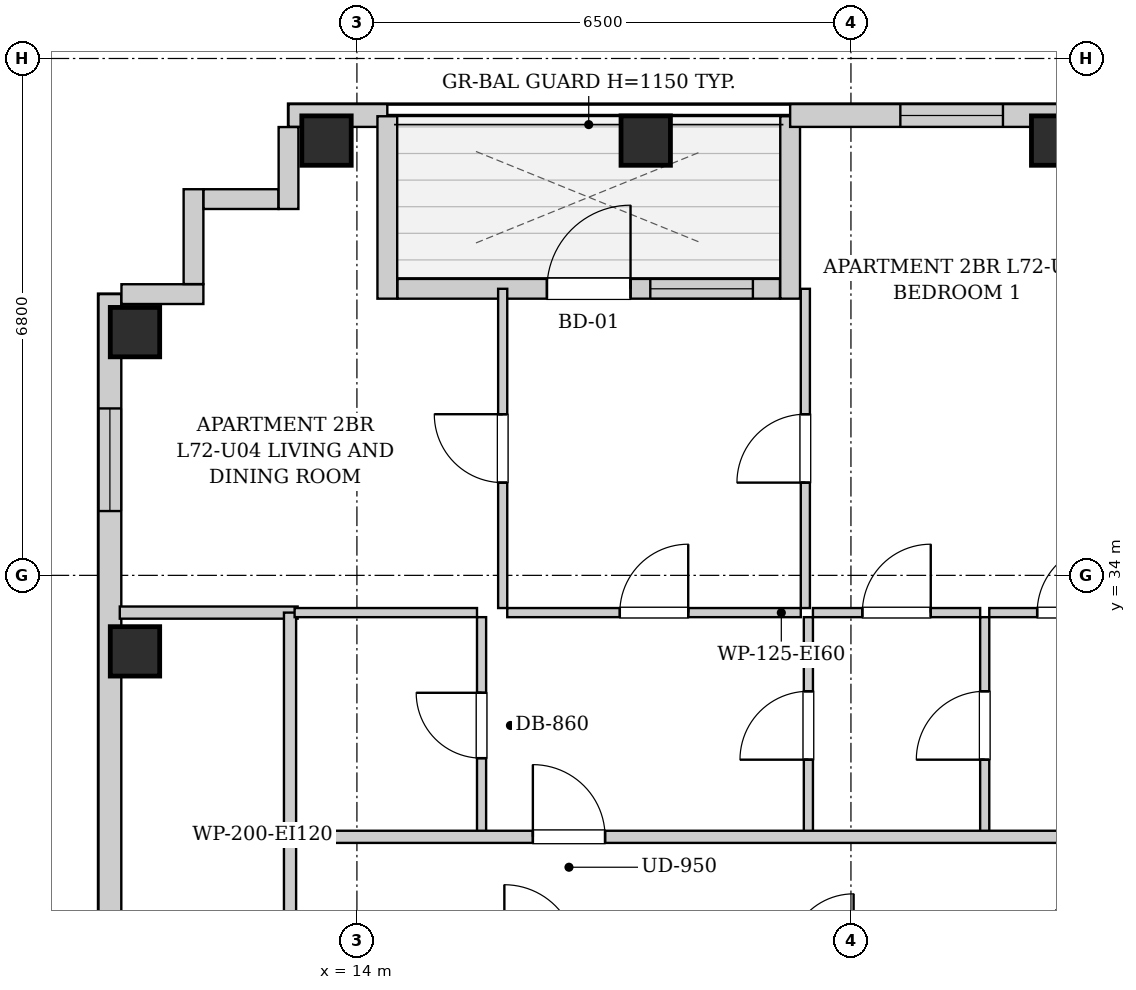
"""IFC4 building model, lengths in metres.
Left out: names, types, materials, properties, quantities, classifications, styles, units other than length and angle.
Written with IfcOpenShell. Run it as: python <this file> out.ifc"""

import sys

from ifc_helpers import new_model, si_unit, direction, frame, frame_2d, origin, origin_2d, place, context, subcontext, project, spatial, rectangle, extrude, element, fill, save


model = new_model("IFC4")
c1 = context("Model", 3, precision=1e-05, world=origin(), true_north=direction((0.0, 1.0)))
c2 = subcontext(c1, "Body", "Model", "MODEL_VIEW")
j1 = project(units=[si_unit("LENGTHUNIT", "METRE"), si_unit("PLANEANGLEUNIT", "RADIAN")], contexts=[c1])
p1 = place(None, origin())
s1 = spatial("IfcSite", under=j1, at=p1, CompositionType="ELEMENT")
p2 = place(p1, origin())
s2 = spatial("IfcBuilding", under=s1, at=p2, CompositionType="ELEMENT")
p3 = place(p2, frame((0.0, 0.0, 247.9)))
s3 = spatial("IfcBuildingStorey", under=s2, at=p3, CompositionType="ELEMENT", Elevation=247.9)
for number, where, z_axis, x_axis in (
    (1, (13.6, 39.72, 0.0), (0.0, 0.0, 1.0), (1.0, 0.0, 0.0)),
    (2, (17.8, 39.72, 0.0), (0.0, 0.0, 1.0), (1.0, 0.0, 0.0)),
    (3, (23.2, 39.72, 0.0), (0.0, 0.0, 1.0), (1.0, 0.0, 0.0)),
    (4, (11.08, 33.0, 0.0), (0.0, 0.0, 1.0), (1.0, 0.0, 0.0)),
    (5, (11.08, 37.2, 0.0), (0.0, 0.0, 1.0), (1.0, 0.0, 0.0)),
):
    element("IfcColumn", number, at=place(p3, frame(where, z_axis=z_axis, x_axis=x_axis)), inside=s3, PredefinedType="COLUMN", context=c2, shape_type="SweptSolid", body=[
        extrude(rectangle(XDim=0.65, YDim=0.65, at=origin_2d()), origin(), (0.0, 0.0, 1.0), 3.4),
    ])
p4 = place(p3, frame((13.1, 40.05, 0.0), z_axis=(0.0, 0.0, 1.0), x_axis=(1.0, 0.0, 0.0)))
e6 = element("IfcWall", 6, at=p4, inside=s3, PredefinedType="SOLIDWALL", context=c2, shape_type="SweptSolid", body=[
    extrude(rectangle(XDim=1.3, YDim=0.3, at=frame_2d((0.65, 0.0))), origin(), (0.0, 0.0, 1.0), 3.14),
])
p5 = place(p3, frame((14.4, 40.04, 0.0), z_axis=(0.0, 0.0, 1.0), x_axis=(0.0, -1.0, 0.0)))
e7 = element("IfcWall", 7, at=p5, inside=s3, PredefinedType="SOLIDWALL", context=c2, shape_type="SweptSolid", body=[
    extrude(rectangle(XDim=2.4, YDim=0.26, at=frame_2d((1.2, 0.0))), origin(), (0.0, 0.0, 1.0), 3.14),
])
p6 = place(p3, frame((14.534, 37.77, 0.0), z_axis=(0.0, 0.0, 1.0), x_axis=(1.0, 0.0, 0.0)))
e8 = element("IfcWall", 8, at=p6, inside=s3, PredefinedType="SOLIDWALL", context=c2, shape_type="SweptSolid", body=[
    extrude(rectangle(XDim=5.032, YDim=0.26, at=frame_2d((2.516, 0.0))), origin(), (0.0, 0.0, 1.0), 3.14),
])
p7 = place(p6, frame((1.966, 0.0, 0.0)))
e9 = element("IfcOpeningElement", 9, at=p7, cuts=e8, PredefinedType="OPENING", context=c2, shape_type="SweptSolid", body=[
    extrude(rectangle(XDim=1.1, YDim=2.0, at=frame_2d((0.55, 1.0))), frame((0.0, 0.14, 0.0), z_axis=(0.0, -1.0, 0.0), x_axis=(1.0, 0.0, 0.0)), (0.0, 0.0, 1.0), 0.28),
])
p8 = place(p6, frame((3.326, 0.0, 0.55)))
e10 = element("IfcOpeningElement", 10, at=p8, cuts=e8, PredefinedType="OPENING", context=c2, shape_type="SweptSolid", body=[
    extrude(rectangle(XDim=1.35, YDim=1.2, at=frame_2d((0.675, 0.6))), frame((0.0, 0.14, 0.0), z_axis=(0.0, -1.0, 0.0), x_axis=(1.0, 0.0, 0.0)), (0.0, 0.0, 1.0), 0.28),
])
p9 = place(p3, frame((19.7, 37.64, 0.0), z_axis=(0.0, 0.0, 1.0), x_axis=(0.0, 1.0, 0.0)))
e11 = element("IfcWall", 11, at=p9, inside=s3, PredefinedType="SOLIDWALL", context=c2, shape_type="SweptSolid", body=[
    extrude(rectangle(XDim=2.4, YDim=0.26, at=frame_2d((1.2, 0.0))), origin(), (0.0, 0.0, 1.0), 3.14),
])
p10 = place(p3, frame((19.7, 40.05, 0.0), z_axis=(0.0, 0.0, 1.0), x_axis=(1.0, 0.0, 0.0)))
e12 = element("IfcWall", 12, at=p10, inside=s3, PredefinedType="SOLIDWALL", context=c2, shape_type="SweptSolid", body=[
    extrude(rectangle(XDim=10.25, YDim=0.3, at=frame_2d((5.125, 0.0))), origin(), (0.0, 0.0, 1.0), 3.14),
])
p11 = place(p10, frame((1.45, 0.0, 0.55)))
e13 = element("IfcOpeningElement", 13, at=p11, cuts=e12, PredefinedType="OPENING", context=c2, shape_type="SweptSolid", body=[
    extrude(rectangle(XDim=1.35, YDim=1.2, at=frame_2d((0.675, 0.6))), frame((0.0, 0.16, 0.0), z_axis=(0.0, -1.0, 0.0), x_axis=(1.0, 0.0, 0.0)), (0.0, 0.0, 1.0), 0.32),
])
p12 = place(p10, frame((7.8, 0.0, 0.55)))
e14 = element("IfcOpeningElement", 14, at=p12, cuts=e12, PredefinedType="OPENING", context=c2, shape_type="SweptSolid", body=[
    extrude(rectangle(XDim=1.35, YDim=1.2, at=frame_2d((0.675, 0.6))), frame((0.0, 0.16, 0.0), z_axis=(0.0, -1.0, 0.0), x_axis=(1.0, 0.0, 0.0)), (0.0, 0.0, 1.0), 0.32),
])
p13 = place(p3, frame((10.75, 6.3, 0.0), z_axis=(0.0, 0.0, 1.0), x_axis=(0.0, 1.0, 0.0)))
e15 = element("IfcWall", 15, at=p13, inside=s3, PredefinedType="SOLIDWALL", context=c2, shape_type="SweptSolid", body=[
    extrude(rectangle(XDim=31.4, YDim=0.3, at=frame_2d((15.7, 0.0))), origin(), (0.0, 0.0, 1.0), 3.14),
])
p14 = place(p13, frame((28.546, 0.0, 0.55)))
e16 = element("IfcOpeningElement", 16, at=p14, cuts=e15, PredefinedType="OPENING", context=c2, shape_type="SweptSolid", body=[
    extrude(rectangle(XDim=1.35, YDim=1.2, at=frame_2d((0.675, 0.6))), frame((0.0, 0.16, 0.0), z_axis=(0.0, -1.0, 0.0), x_axis=(1.0, 0.0, 0.0)), (0.0, 0.0, 1.0), 0.32),
])
p15 = place(p13, frame((11.85, 0.0, 0.55)))
e17 = element("IfcOpeningElement", 17, at=p15, cuts=e15, PredefinedType="OPENING", context=c2, shape_type="SweptSolid", body=[
    extrude(rectangle(XDim=1.35, YDim=1.2, at=frame_2d((0.675, 0.6))), frame((0.0, 0.16, 0.0), z_axis=(0.0, -1.0, 0.0), x_axis=(1.0, 0.0, 0.0)), (0.0, 0.0, 1.0), 0.32),
])
p16 = place(p13, frame((9.185, 0.0, 0.55)))
e18 = element("IfcOpeningElement", 18, at=p16, cuts=e15, PredefinedType="OPENING", context=c2, shape_type="SweptSolid", body=[
    extrude(rectangle(XDim=1.35, YDim=1.2, at=frame_2d((0.675, 0.6))), frame((0.0, 0.16, 0.0), z_axis=(0.0, -1.0, 0.0), x_axis=(1.0, 0.0, 0.0)), (0.0, 0.0, 1.0), 0.32),
])
p17 = place(p13, frame((19.006, 0.0, 0.55)))
e19 = element("IfcOpeningElement", 19, at=p17, cuts=e15, PredefinedType="OPENING", context=c2, shape_type="SweptSolid", body=[
    extrude(rectangle(XDim=1.35, YDim=1.2, at=frame_2d((0.675, 0.6))), frame((0.0, 0.16, 0.0), z_axis=(0.0, -1.0, 0.0), x_axis=(1.0, 0.0, 0.0)), (0.0, 0.0, 1.0), 0.32),
])
p18 = place(p13, frame((20.616, 0.0, 0.55)))
e20 = element("IfcOpeningElement", 20, at=p18, cuts=e15, PredefinedType="OPENING", context=c2, shape_type="SweptSolid", body=[
    extrude(rectangle(XDim=1.35, YDim=1.2, at=frame_2d((0.675, 0.6))), frame((0.0, 0.16, 0.0), z_axis=(0.0, -1.0, 0.0), x_axis=(1.0, 0.0, 0.0)), (0.0, 0.0, 1.0), 0.32),
])
p19 = place(p3, frame((10.902, 37.7, 0.0), z_axis=(0.0, 0.0, 1.0), x_axis=(1.0, 0.0, 0.0)))
e21 = element("IfcWall", 21, at=p19, inside=s3, PredefinedType="SOLIDWALL", context=c2, shape_type="SweptSolid", body=[
    extrude(rectangle(XDim=1.078, YDim=0.26, at=frame_2d((0.539, 0.0))), origin(), (0.0, 0.0, 1.0), 3.14),
])
p20 = place(p3, frame((11.85, 37.832, 0.0), z_axis=(0.0, 0.0, 1.0), x_axis=(0.0, 1.0, 0.0)))
e22 = element("IfcWall", 22, at=p20, inside=s3, PredefinedType="SOLIDWALL", context=c2, shape_type="SweptSolid", body=[
    extrude(rectangle(XDim=1.248, YDim=0.26, at=frame_2d((0.624, 0.0))), origin(), (0.0, 0.0, 1.0), 3.14),
])
p21 = place(p3, frame((11.982, 38.95, 0.0), z_axis=(0.0, 0.0, 1.0), x_axis=(1.0, 0.0, 0.0)))
e23 = element("IfcWall", 23, at=p21, inside=s3, PredefinedType="SOLIDWALL", context=c2, shape_type="SweptSolid", body=[
    extrude(rectangle(XDim=0.986, YDim=0.26, at=frame_2d((0.493, 0.0))), origin(), (0.0, 0.0, 1.0), 3.14),
])
p22 = place(p3, frame((13.1, 38.82, 0.0), z_axis=(0.0, 0.0, 1.0), x_axis=(0.0, 1.0, 0.0)))
e24 = element("IfcWall", 24, at=p22, inside=s3, PredefinedType="SOLIDWALL", context=c2, shape_type="SweptSolid", body=[
    extrude(rectangle(XDim=1.078, YDim=0.26, at=frame_2d((0.539, 0.0))), origin(), (0.0, 0.0, 1.0), 3.14),
])
p23 = place(p3, frame((13.12, 28.98, 0.0), z_axis=(0.0, 0.0, 1.0), x_axis=(0.0, 1.0, 0.0)))
e25 = element("IfcWall", 25, at=p23, inside=s3, PredefinedType="PARTITIONING", context=c2, shape_type="SweptSolid", body=[
    extrude(rectangle(XDim=1.58, YDim=0.16, at=frame_2d((0.79, 0.0))), origin(), (0.0, 0.0, 1.0), 3.14),
])
p24 = place(p3, frame((10.88, 33.51, 0.0), z_axis=(0.0, 0.0, 1.0), x_axis=(1.0, 0.0, 0.0)))
e26 = element("IfcWall", 26, at=p24, inside=s3, PredefinedType="PARTITIONING", context=c2, shape_type="SweptSolid", body=[
    extrude(rectangle(XDim=2.34, YDim=0.16, at=frame_2d((1.17, 0.0))), origin(), (0.0, 0.0, 1.0), 3.14),
])
p25 = place(p3, frame((13.12, 30.6, 0.0), z_axis=(0.0, 0.0, 1.0), x_axis=(0.0, 1.0, 0.0)))
e27 = element("IfcWall", 27, at=p25, inside=s3, PredefinedType="PARTITIONING", context=c2, shape_type="SweptSolid", body=[
    extrude(rectangle(XDim=2.91, YDim=0.16, at=frame_2d((1.455, 0.0))), origin(), (0.0, 0.0, 1.0), 3.14),
])
p26 = place(p3, frame((15.64, 30.6, 0.0), z_axis=(0.0, 0.0, 1.0), x_axis=(0.0, 1.0, 0.0)))
e28 = element("IfcWall", 28, at=p26, inside=s3, PredefinedType="PARTITIONING", context=c2, shape_type="SweptSolid", body=[
    extrude(rectangle(XDim=2.85, YDim=0.12, at=frame_2d((1.425, 0.0))), origin(), (0.0, 0.0, 1.0), 3.14),
])
p27 = place(p26, frame((0.995, 0.0, 0.0)))
e29 = element("IfcOpeningElement", 29, at=p27, cuts=e28, PredefinedType="OPENING", context=c2, shape_type="SweptSolid", body=[
    extrude(rectangle(XDim=0.86, YDim=2.05, at=frame_2d((0.43, 1.025))), frame((0.0, 0.07, 0.0), z_axis=(0.0, -1.0, 0.0), x_axis=(1.0, 0.0, 0.0)), (0.0, 0.0, 1.0), 0.14),
])
p28 = place(p3, frame((13.18, 33.51, 0.0), z_axis=(0.0, 0.0, 1.0), x_axis=(1.0, 0.0, 0.0)))
e30 = element("IfcWall", 30, at=p28, inside=s3, PredefinedType="PARTITIONING", context=c2, shape_type="SweptSolid", body=[
    extrude(rectangle(XDim=2.4, YDim=0.12, at=frame_2d((1.2, 0.0))), origin(), (0.0, 0.0, 1.0), 3.14),
])
p29 = place(p3, frame((19.94, 30.6, 0.0), z_axis=(0.0, 0.0, 1.0), x_axis=(0.0, 1.0, 0.0)))
e31 = element("IfcWall", 31, at=p29, inside=s3, PredefinedType="PARTITIONING", context=c2, shape_type="SweptSolid", body=[
    extrude(rectangle(XDim=2.85, YDim=0.12, at=frame_2d((1.425, 0.0))), origin(), (0.0, 0.0, 1.0), 3.14),
])
p30 = place(p29, frame((0.975, 0.0, 0.0)))
e32 = element("IfcOpeningElement", 32, at=p30, cuts=e31, PredefinedType="OPENING", context=c2, shape_type="SweptSolid", body=[
    extrude(rectangle(XDim=0.9, YDim=2.05, at=frame_2d((0.45, 1.025))), frame((0.0, 0.07, 0.0), z_axis=(0.0, -1.0, 0.0), x_axis=(1.0, 0.0, 0.0)), (0.0, 0.0, 1.0), 0.14),
])
p31 = place(p3, frame((15.978, 33.51, 0.0), z_axis=(0.0, 0.0, 1.0), x_axis=(1.0, 0.0, 0.0)))
e33 = element("IfcWall", 33, at=p31, inside=s3, PredefinedType="PARTITIONING", context=c2, shape_type="SweptSolid", body=[
    extrude(rectangle(XDim=3.862, YDim=0.12, at=frame_2d((1.931, 0.0))), origin(), (0.0, 0.0, 1.0), 3.14),
])
p32 = place(p31, frame((1.481, 0.0, 0.0)))
e34 = element("IfcOpeningElement", 34, at=p32, cuts=e33, PredefinedType="OPENING", context=c2, shape_type="SweptSolid", body=[
    extrude(rectangle(XDim=0.9, YDim=2.05, at=frame_2d((0.45, 1.025))), frame((0.0, 0.07, 0.0), z_axis=(0.0, -1.0, 0.0), x_axis=(1.0, 0.0, 0.0)), (0.0, 0.0, 1.0), 0.14),
])
p33 = place(p3, frame((22.26, 30.6, 0.0), z_axis=(0.0, 0.0, 1.0), x_axis=(0.0, 1.0, 0.0)))
e35 = element("IfcWall", 35, at=p33, inside=s3, PredefinedType="PARTITIONING", context=c2, shape_type="SweptSolid", body=[
    extrude(rectangle(XDim=2.85, YDim=0.12, at=frame_2d((1.425, 0.0))), origin(), (0.0, 0.0, 1.0), 3.14),
])
p34 = place(p33, frame((0.975, 0.0, 0.0)))
e36 = element("IfcOpeningElement", 36, at=p34, cuts=e35, PredefinedType="OPENING", context=c2, shape_type="SweptSolid", body=[
    extrude(rectangle(XDim=0.9, YDim=2.05, at=frame_2d((0.45, 1.025))), frame((0.0, 0.07, 0.0), z_axis=(0.0, -1.0, 0.0), x_axis=(1.0, 0.0, 0.0)), (0.0, 0.0, 1.0), 0.14),
])
p35 = place(p3, frame((20.0, 33.51, 0.0), z_axis=(0.0, 0.0, 1.0), x_axis=(1.0, 0.0, 0.0)))
e37 = element("IfcWall", 37, at=p35, inside=s3, PredefinedType="PARTITIONING", context=c2, shape_type="SweptSolid", body=[
    extrude(rectangle(XDim=2.2, YDim=0.12, at=frame_2d((1.1, 0.0))), origin(), (0.0, 0.0, 1.0), 3.14),
])
p36 = place(p35, frame((0.65, 0.0, 0.0)))
e38 = element("IfcOpeningElement", 38, at=p36, cuts=e37, PredefinedType="OPENING", context=c2, shape_type="SweptSolid", body=[
    extrude(rectangle(XDim=0.9, YDim=2.05, at=frame_2d((0.45, 1.025))), frame((0.0, 0.07, 0.0), z_axis=(0.0, -1.0, 0.0), x_axis=(1.0, 0.0, 0.0)), (0.0, 0.0, 1.0), 0.14),
])
p37 = place(p3, frame((22.32, 33.51, 0.0), z_axis=(0.0, 0.0, 1.0), x_axis=(1.0, 0.0, 0.0)))
e39 = element("IfcWall", 39, at=p37, inside=s3, PredefinedType="PARTITIONING", context=c2, shape_type="SweptSolid", body=[
    extrude(rectangle(XDim=2.16, YDim=0.12, at=frame_2d((1.08, 0.0))), origin(), (0.0, 0.0, 1.0), 3.14),
])
p38 = place(p37, frame((0.63, 0.0, 0.0)))
e40 = element("IfcOpeningElement", 40, at=p38, cuts=e39, PredefinedType="OPENING", context=c2, shape_type="SweptSolid", body=[
    extrude(rectangle(XDim=0.9, YDim=2.05, at=frame_2d((0.45, 1.025))), frame((0.0, 0.07, 0.0), z_axis=(0.0, -1.0, 0.0), x_axis=(1.0, 0.0, 0.0)), (0.0, 0.0, 1.0), 0.14),
])
p39 = place(p3, frame((15.918, 33.57, 0.0), z_axis=(0.0, 0.0, 1.0), x_axis=(0.0, 1.0, 0.0)))
e41 = element("IfcWall", 41, at=p39, inside=s3, PredefinedType="PARTITIONING", context=c2, shape_type="SweptSolid", body=[
    extrude(rectangle(XDim=4.2, YDim=0.12, at=frame_2d((2.1, 0.0))), origin(), (0.0, 0.0, 1.0), 3.14),
])
p40 = place(p39, frame((1.65, 0.0, 0.0)))
e42 = element("IfcOpeningElement", 42, at=p40, cuts=e41, PredefinedType="OPENING", context=c2, shape_type="SweptSolid", body=[
    extrude(rectangle(XDim=0.9, YDim=2.05, at=frame_2d((0.45, 1.025))), frame((0.0, 0.07, 0.0), z_axis=(0.0, -1.0, 0.0), x_axis=(1.0, 0.0, 0.0)), (0.0, 0.0, 1.0), 0.14),
])
p41 = place(p3, frame((19.9, 33.57, 0.0), z_axis=(0.0, 0.0, 1.0), x_axis=(0.0, 1.0, 0.0)))
e43 = element("IfcWall", 43, at=p41, inside=s3, PredefinedType="PARTITIONING", context=c2, shape_type="SweptSolid", body=[
    extrude(rectangle(XDim=4.2, YDim=0.12, at=frame_2d((2.1, 0.0))), origin(), (0.0, 0.0, 1.0), 3.14),
])
p42 = place(p41, frame((1.65, 0.0, 0.0)))
e44 = element("IfcOpeningElement", 44, at=p42, cuts=e43, PredefinedType="OPENING", context=c2, shape_type="SweptSolid", body=[
    extrude(rectangle(XDim=0.9, YDim=2.05, at=frame_2d((0.45, 1.025))), frame((0.0, 0.07, 0.0), z_axis=(0.0, -1.0, 0.0), x_axis=(1.0, 0.0, 0.0)), (0.0, 0.0, 1.0), 0.14),
])
p43 = place(p3, frame((13.15, 30.56, 0.0), z_axis=(0.0, 0.0, 1.0), x_axis=(1.0, 0.0, 0.0)))
e45 = element("IfcWall", 45, at=p43, inside=s3, PredefinedType="PARTITIONING", context=c2, shape_type="SweptSolid", body=[
    extrude(rectangle(XDim=24.6, YDim=0.16, at=frame_2d((12.3, 0.0))), origin(), (0.0, 0.0, 1.0), 3.14),
])
p44 = place(p43, frame((3.165, 0.0, 0.0)))
e46 = element("IfcOpeningElement", 46, at=p44, cuts=e45, PredefinedType="OPENING", context=c2, shape_type="SweptSolid", body=[
    extrude(rectangle(XDim=0.95, YDim=2.1, at=frame_2d((0.475, 1.05))), frame((0.0, 0.09, 0.0), z_axis=(0.0, -1.0, 0.0), x_axis=(1.0, 0.0, 0.0)), (0.0, 0.0, 1.0), 0.18),
])
p45 = place(p43, frame((20.585, 0.0, 0.0)))
e47 = element("IfcOpeningElement", 47, at=p45, cuts=e45, PredefinedType="OPENING", context=c2, shape_type="SweptSolid", body=[
    extrude(rectangle(XDim=0.95, YDim=2.1, at=frame_2d((0.475, 1.05))), frame((0.0, 0.09, 0.0), z_axis=(0.0, -1.0, 0.0), x_axis=(1.0, 0.0, 0.0)), (0.0, 0.0, 1.0), 0.18),
])
p46 = place(p27, origin())
e48 = element("IfcDoor", 48, at=p46, inside=s3, OperationType="SINGLE_SWING_RIGHT", PredefinedType="DOOR", context=c2, shape_type="SweptSolid", body=[
    extrude(rectangle(XDim=0.86, YDim=2.05, at=frame_2d((0.43, 1.025))), frame((0.0, 0.025, 0.0), z_axis=(0.0, -1.0, 0.0), x_axis=(1.0, 0.0, 0.0)), (0.0, 0.0, 1.0), 0.05),
])
fill(e29, e48)
p47 = place(p30, origin())
e49 = element("IfcDoor", 49, at=p47, inside=s3, OperationType="SINGLE_SWING_LEFT", PredefinedType="DOOR", context=c2, shape_type="SweptSolid", body=[
    extrude(rectangle(XDim=0.9, YDim=2.05, at=frame_2d((0.45, 1.025))), frame((0.0, 0.025, 0.0), z_axis=(0.0, -1.0, 0.0), x_axis=(1.0, 0.0, 0.0)), (0.0, 0.0, 1.0), 0.05),
])
fill(e32, e49)
p48 = place(p32, origin())
e50 = element("IfcDoor", 50, at=p48, inside=s3, OperationType="SINGLE_SWING_RIGHT", PredefinedType="DOOR", context=c2, shape_type="SweptSolid", body=[
    extrude(rectangle(XDim=0.9, YDim=2.05, at=frame_2d((0.45, 1.025))), frame((0.0, 0.025, 0.0), z_axis=(0.0, -1.0, 0.0), x_axis=(1.0, 0.0, 0.0)), (0.0, 0.0, 1.0), 0.05),
])
fill(e34, e50)
p49 = place(p34, origin())
e51 = element("IfcDoor", 51, at=p49, inside=s3, OperationType="SINGLE_SWING_LEFT", PredefinedType="DOOR", context=c2, shape_type="SweptSolid", body=[
    extrude(rectangle(XDim=0.9, YDim=2.05, at=frame_2d((0.45, 1.025))), frame((0.0, 0.025, 0.0), z_axis=(0.0, -1.0, 0.0), x_axis=(1.0, 0.0, 0.0)), (0.0, 0.0, 1.0), 0.05),
])
fill(e36, e51)
p50 = place(p36, origin())
e52 = element("IfcDoor", 52, at=p50, inside=s3, OperationType="SINGLE_SWING_RIGHT", PredefinedType="DOOR", context=c2, shape_type="SweptSolid", body=[
    extrude(rectangle(XDim=0.9, YDim=2.05, at=frame_2d((0.45, 1.025))), frame((0.0, 0.025, 0.0), z_axis=(0.0, -1.0, 0.0), x_axis=(1.0, 0.0, 0.0)), (0.0, 0.0, 1.0), 0.05),
])
fill(e38, e52)
p51 = place(p38, origin())
e53 = element("IfcDoor", 53, at=p51, inside=s3, OperationType="SINGLE_SWING_RIGHT", PredefinedType="DOOR", context=c2, shape_type="SweptSolid", body=[
    extrude(rectangle(XDim=0.9, YDim=2.05, at=frame_2d((0.45, 1.025))), frame((0.0, 0.025, 0.0), z_axis=(0.0, -1.0, 0.0), x_axis=(1.0, 0.0, 0.0)), (0.0, 0.0, 1.0), 0.05),
])
fill(e40, e53)
p52 = place(p40, origin())
e54 = element("IfcDoor", 54, at=p52, inside=s3, OperationType="SINGLE_SWING_RIGHT", PredefinedType="DOOR", context=c2, shape_type="SweptSolid", body=[
    extrude(rectangle(XDim=0.9, YDim=2.05, at=frame_2d((0.45, 1.025))), frame((0.0, 0.025, 0.0), z_axis=(0.0, -1.0, 0.0), x_axis=(1.0, 0.0, 0.0)), (0.0, 0.0, 1.0), 0.05),
])
fill(e42, e54)
p53 = place(p42, origin())
e55 = element("IfcDoor", 55, at=p53, inside=s3, OperationType="SINGLE_SWING_LEFT", PredefinedType="DOOR", context=c2, shape_type="SweptSolid", body=[
    extrude(rectangle(XDim=0.9, YDim=2.05, at=frame_2d((0.45, 1.025))), frame((0.0, 0.025, 0.0), z_axis=(0.0, -1.0, 0.0), x_axis=(1.0, 0.0, 0.0)), (0.0, 0.0, 1.0), 0.05),
])
fill(e44, e55)
p54 = place(p44, origin())
e56 = element("IfcDoor", 56, at=p54, inside=s3, OperationType="SINGLE_SWING_LEFT", PredefinedType="DOOR", context=c2, shape_type="SweptSolid", body=[
    extrude(rectangle(XDim=0.95, YDim=2.1, at=frame_2d((0.475, 1.05))), frame((0.0, 0.025, 0.0), z_axis=(0.0, -1.0, 0.0), x_axis=(1.0, 0.0, 0.0)), (0.0, 0.0, 1.0), 0.05),
])
fill(e46, e56)
p55 = place(p7, origin())
e57 = element("IfcDoor", 57, at=p55, inside=s3, OperationType="SINGLE_SWING_RIGHT", PredefinedType="DOOR", context=c2, shape_type="SweptSolid", body=[
    extrude(rectangle(XDim=1.1, YDim=2.0, at=frame_2d((0.55, 1.0))), frame((0.0, 0.025, 0.0), z_axis=(0.0, -1.0, 0.0), x_axis=(1.0, 0.0, 0.0)), (0.0, 0.0, 1.0), 0.05),
])
fill(e9, e57)
p56 = place(p14, origin())
e58 = element("IfcWindow", 58, at=p56, inside=s3, PartitioningType="SINGLE_PANEL", PredefinedType="WINDOW", context=c2, shape_type="SweptSolid", body=[
    extrude(rectangle(XDim=1.35, YDim=1.2, at=frame_2d((0.675, 0.6))), frame((0.0, 0.03, 0.0), z_axis=(0.0, -1.0, 0.0), x_axis=(1.0, 0.0, 0.0)), (0.0, 0.0, 1.0), 0.06),
])
fill(e16, e58)
p57 = place(p8, origin())
e59 = element("IfcWindow", 59, at=p57, inside=s3, PartitioningType="SINGLE_PANEL", PredefinedType="WINDOW", context=c2, shape_type="SweptSolid", body=[
    extrude(rectangle(XDim=1.35, YDim=1.2, at=frame_2d((0.675, 0.6))), frame((0.0, 0.03, 0.0), z_axis=(0.0, -1.0, 0.0), x_axis=(1.0, 0.0, 0.0)), (0.0, 0.0, 1.0), 0.06),
])
fill(e10, e59)
p58 = place(p11, origin())
e60 = element("IfcWindow", 60, at=p58, inside=s3, PartitioningType="SINGLE_PANEL", PredefinedType="WINDOW", context=c2, shape_type="SweptSolid", body=[
    extrude(rectangle(XDim=1.35, YDim=1.2, at=frame_2d((0.675, 0.6))), frame((0.0, 0.03, 0.0), z_axis=(0.0, -1.0, 0.0), x_axis=(1.0, 0.0, 0.0)), (0.0, 0.0, 1.0), 0.06),
])
fill(e13, e60)
save(model, sys.argv[1])
